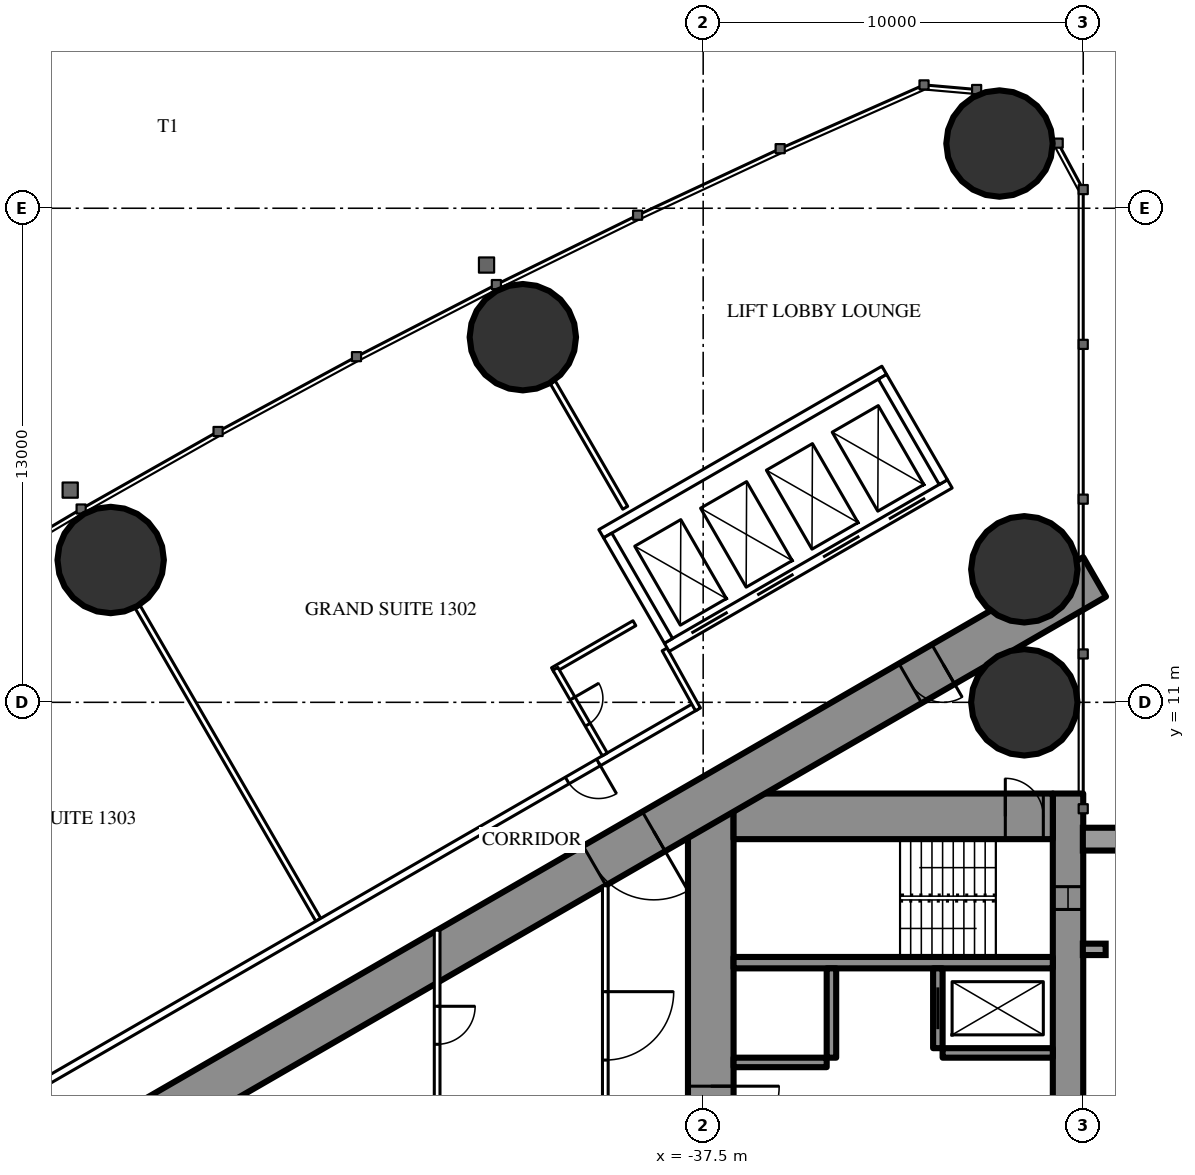
"""IFC4 building model, lengths in metres.
Left out: names, types, materials, properties, quantities, classifications, styles, units other than length and angle.
Written with IfcOpenShell. Run it as: python <this file> out.ifc"""

import sys

from ifc_helpers import new_model, si_unit, direction, frame, frame_2d, origin, origin_2d, place, context, subcontext, project, spatial, rectangle, hollow_circle, extrude, element, fill, save


model = new_model("IFC4")
c1 = context("Model", 3, precision=1e-05, world=origin(), true_north=direction((0.0, 1.0)))
c2 = subcontext(c1, "Body", "Model", "MODEL_VIEW")
j1 = project(units=[si_unit("LENGTHUNIT", "METRE"), si_unit("PLANEANGLEUNIT", "RADIAN")], contexts=[c1])
p1 = place(None, origin())
s1 = spatial("IfcSite", under=j1, at=p1, CompositionType="ELEMENT")
p2 = place(p1, origin())
s2 = spatial("IfcBuilding", under=s1, at=p2, CompositionType="ELEMENT")
p3 = place(p2, frame((0.0, 0.0, 53.0)))
s3 = spatial("IfcBuildingStorey", under=s2, at=p3, CompositionType="ELEMENT", Elevation=53.0)
for number, where, z_axis, x_axis in (
    (1, (-29.703, 25.703, 0.0), (0.0, 0.0, 1.0), (1.0, 0.0, 0.0)),
    (2, (-29.05, 11.0, 0.0), (0.0, 0.0, 1.0), (1.0, 0.0, 0.0)),
    (3, (-29.05, 14.5, 0.0), (0.0, 0.0, 1.0), (1.0, 0.0, 0.0)),
    (4, (-42.245, 20.607, 0.0), (0.0, 0.0, 1.0), (1.0, 0.0, 0.0)),
    (5, (-53.09, 14.745, 0.0), (0.0, 0.0, 1.0), (1.0, 0.0, 0.0)),
):
    element("IfcColumn", number, at=place(p3, frame(where, z_axis=z_axis, x_axis=x_axis)), inside=s3, PredefinedType="COLUMN", context=c2, shape_type="SweptSolid", body=[
        extrude(hollow_circle(Radius=1.4, WallThickness=0.12, at=origin_2d()), origin(), (0.0, 0.0, 1.0), 3.5),
    ])
p4 = place(p3, frame((-27.9, 8.6, 0.0), z_axis=(0.0, 0.0, 1.0), x_axis=(0.0, -1.0, 0.0)))
e6 = element("IfcWall", 6, at=p4, inside=s3, PredefinedType="SHEAR", context=c2, shape_type="SweptSolid", body=[
    extrude(rectangle(XDim=17.2, YDim=0.8, at=frame_2d((8.6, 0.0))), origin(), (0.0, 0.0, 1.0), 3.5),
])
p5 = place(p4, frame((2.45, 0.0, 0.6)))
e7 = element("IfcOpeningElement", 7, at=p5, cuts=e6, PredefinedType="OPENING", context=c2, shape_type="SweptSolid", body=[
    extrude(rectangle(XDim=0.6, YDim=2.1, at=frame_2d((0.3, 1.05))), frame((0.0, 0.41, 0.0), z_axis=(0.0, -1.0, 0.0), x_axis=(1.0, 0.0, 0.0)), (0.0, 0.0, 1.0), 0.82),
])
p6 = place(p4, frame((14.15, 0.0, 0.6)))
e8 = element("IfcOpeningElement", 8, at=p6, cuts=e6, PredefinedType="OPENING", context=c2, shape_type="SweptSolid", body=[
    extrude(rectangle(XDim=0.6, YDim=2.1, at=frame_2d((0.3, 1.05))), frame((0.0, 0.41, 0.0), z_axis=(0.0, -1.0, 0.0), x_axis=(1.0, 0.0, 0.0)), (0.0, 0.0, 1.0), 0.82),
])
p7 = place(p3, frame((-37.3, 8.6, 0.0), z_axis=(0.0, 0.0, 1.0), x_axis=(0.0, -1.0, 0.0)))
e9 = element("IfcWall", 9, at=p7, inside=s3, PredefinedType="SHEAR", context=c2, shape_type="SweptSolid", body=[
    extrude(rectangle(XDim=17.2, YDim=1.2, at=frame_2d((8.6, 0.0))), origin(), (0.0, 0.0, 1.0), 3.5),
])
p8 = place(p7, frame((7.7, 0.0, 0.0)))
e10 = element("IfcOpeningElement", 10, at=p8, cuts=e9, PredefinedType="OPENING", context=c2, shape_type="SweptSolid", body=[
    extrude(rectangle(XDim=1.8, YDim=2.2, at=frame_2d((0.9, 1.1))), frame((0.0, 0.61, 0.0), z_axis=(0.0, -1.0, 0.0), x_axis=(1.0, 0.0, 0.0)), (0.0, 0.0, 1.0), 1.22),
])
p9 = place(p3, frame((-28.3, 8.0, 0.0), z_axis=(0.0, 0.0, 1.0), x_axis=(-1.0, 0.0, 0.0)))
e11 = element("IfcWall", 11, at=p9, inside=s3, PredefinedType="SHEAR", context=c2, shape_type="SweptSolid", body=[
    extrude(rectangle(XDim=8.4, YDim=1.2, at=frame_2d((4.2, 0.0))), origin(), (0.0, 0.0, 1.0), 3.5),
])
p10 = place(p9, frame((0.25, 0.0, 0.0)))
e12 = element("IfcOpeningElement", 12, at=p10, cuts=e11, PredefinedType="OPENING", context=c2, shape_type="SweptSolid", body=[
    extrude(rectangle(XDim=1.0, YDim=2.2, at=frame_2d((0.5, 1.1))), frame((0.0, 0.61, 0.0), z_axis=(0.0, -1.0, 0.0), x_axis=(1.0, 0.0, 0.0)), (0.0, 0.0, 1.0), 1.22),
])
p11 = place(p3, frame((-28.3, 4.15, 0.0), z_axis=(0.0, 0.0, 1.0), x_axis=(-1.0, 0.0, 0.0)))
e13 = element("IfcWall", 13, at=p11, inside=s3, PredefinedType="SHEAR", context=c2, shape_type="SweptSolid", body=[
    extrude(rectangle(XDim=8.4, YDim=0.3, at=frame_2d((4.2, 0.0))), origin(), (0.0, 0.0, 1.0), 3.5),
])
p12 = place(p3, frame((-31.325, 4.0, 0.0), z_axis=(0.0, 0.0, 1.0), x_axis=(0.0, -1.0, 0.0)))
e14 = element("IfcWall", 14, at=p12, inside=s3, PredefinedType="SHEAR", context=c2, shape_type="SweptSolid", body=[
    extrude(rectangle(XDim=2.1, YDim=0.25, at=frame_2d((1.05, 0.0))), origin(), (0.0, 0.0, 1.0), 3.5),
])
p13 = place(p12, frame((0.5, 0.0, 0.0)))
e15 = element("IfcOpeningElement", 15, at=p13, cuts=e14, PredefinedType="OPENING", context=c2, shape_type="SweptSolid", body=[
    extrude(rectangle(XDim=1.1, YDim=2.2, at=frame_2d((0.55, 1.1))), frame((0.0, 0.135, 0.0), z_axis=(0.0, -1.0, 0.0), x_axis=(1.0, 0.0, 0.0)), (0.0, 0.0, 1.0), 0.27),
])
p14 = place(p3, frame((-34.125, 4.0, 0.0), z_axis=(0.0, 0.0, 1.0), x_axis=(0.0, -1.0, 0.0)))
e16 = element("IfcWall", 16, at=p14, inside=s3, PredefinedType="SHEAR", context=c2, shape_type="SweptSolid", body=[
    extrude(rectangle(XDim=2.35, YDim=0.25, at=frame_2d((1.175, 0.0))), origin(), (0.0, 0.0, 1.0), 3.5),
])
p15 = place(p3, frame((-28.3, 1.775, 0.0), z_axis=(0.0, 0.0, 1.0), x_axis=(-1.0, 0.0, 0.0)))
e17 = element("IfcWall", 17, at=p15, inside=s3, PredefinedType="SHEAR", context=c2, shape_type="SweptSolid", body=[
    extrude(rectangle(XDim=2.9, YDim=0.25, at=frame_2d((1.45, 0.0))), origin(), (0.0, 0.0, 1.0), 3.5),
])
p16 = place(p3, frame((-34.25, 1.525, 0.0), z_axis=(0.0, 0.0, 1.0), x_axis=(-1.0, 0.0, 0.0)))
e18 = element("IfcWall", 18, at=p16, inside=s3, PredefinedType="SHEAR", context=c2, shape_type="SweptSolid", body=[
    extrude(rectangle(XDim=2.45, YDim=0.25, at=frame_2d((1.225, 0.0))), origin(), (0.0, 0.0, 1.0), 3.5),
])
p17 = place(p3, frame((-27.2, 14.3, 0.0), z_axis=(0.0, 0.0, 1.0), x_axis=(-0.866026593062, -0.499997940104, 0.0)))
e19 = element("IfcWall", 19, at=p17, inside=s3, PredefinedType="SHEAR", context=c2, shape_type="SweptSolid", body=[
    extrude(rectangle(XDim=28.946, YDim=1.2, at=frame_2d((14.473, 0.0))), origin(), (0.0, 0.0, 1.0), 3.5),
])
p18 = place(p17, frame((4.6, 0.0, 0.0)))
e20 = element("IfcOpeningElement", 20, at=p18, cuts=e19, PredefinedType="OPENING", context=c2, shape_type="SweptSolid", body=[
    extrude(rectangle(XDim=1.0, YDim=2.2, at=frame_2d((0.5, 1.1))), frame((0.0, 0.61, 0.0), z_axis=(0.0, -1.0, 0.0), x_axis=(1.0, 0.0, 0.0)), (0.0, 0.0, 1.0), 1.22),
])
p19 = place(p17, frame((13.395, 0.0, 0.0)))
e21 = element("IfcOpeningElement", 21, at=p19, cuts=e19, PredefinedType="OPENING", context=c2, shape_type="SweptSolid", body=[
    extrude(rectangle(XDim=1.8, YDim=2.2, at=frame_2d((0.9, 1.1))), frame((0.0, 0.61, 0.0), z_axis=(0.0, -1.0, 0.0), x_axis=(1.0, 0.0, 0.0)), (0.0, 0.0, 1.0), 1.22),
])
p20 = place(p3, frame((-47.627, 5.278, 0.0), z_axis=(0.0, 0.0, 1.0), x_axis=(-0.500009844318, 0.86601972009, 0.0)))
e22 = element("IfcWall", 22, at=p20, inside=s3, PredefinedType="PARTITIONING", context=c2, shape_type="SweptSolid", body=[
    extrude(rectangle(XDim=9.51, YDim=0.15, at=frame_2d((4.755, 0.0))), origin(), (0.0, 0.0, 1.0), 2.25),
])
p21 = place(p3, frame((-39.551, 16.119, 0.0), z_axis=(0.0, 0.0, 1.0), x_axis=(-0.500014214979, 0.866017196607, 0.0)))
e23 = element("IfcWall", 23, at=p21, inside=s3, PredefinedType="PARTITIONING", context=c2, shape_type="SweptSolid", body=[
    extrude(rectangle(XDim=3.815, YDim=0.15, at=frame_2d((1.907, 0.0))), origin(), (0.0, 0.0, 1.0), 3.25),
])
p22 = place(p3, frame((-37.7, 10.894, 0.0), z_axis=(0.0, 0.0, 1.0), x_axis=(-0.866027905338, -0.499995667157, 0.0)))
e24 = element("IfcWall", 24, at=p22, inside=s3, PredefinedType="PARTITIONING", context=c2, shape_type="SweptSolid", body=[
    extrude(rectangle(XDim=21.787, YDim=0.2, at=frame_2d((10.894, 0.0))), origin(), (0.0, 0.0, 1.0), 3.25),
])
p23 = place(p22, frame((20.237, 0.0, 0.0)))
e25 = element("IfcOpeningElement", 25, at=p23, cuts=e24, PredefinedType="OPENING", context=c2, shape_type="SweptSolid", body=[
    extrude(rectangle(XDim=0.95, YDim=2.2, at=frame_2d((0.475, 1.1))), frame((0.0, 0.11, 0.0), z_axis=(0.0, -1.0, 0.0), x_axis=(1.0, 0.0, 0.0)), (0.0, 0.0, 1.0), 0.22),
])
p24 = place(p22, frame((2.95, 0.0, 0.0)))
e26 = element("IfcOpeningElement", 26, at=p24, cuts=e24, PredefinedType="OPENING", context=c2, shape_type="SweptSolid", body=[
    extrude(rectangle(XDim=0.95, YDim=2.2, at=frame_2d((0.475, 1.1))), frame((0.0, 0.11, 0.0), z_axis=(0.0, -1.0, 0.0), x_axis=(1.0, 0.0, 0.0)), (0.0, 0.0, 1.0), 0.22),
])
p25 = place(p3, frame((-38.513, 12.392, 0.0), z_axis=(0.0, 0.0, 1.0), x_axis=(0.485585508183, -0.874189175317, 0.0)))
e27 = element("IfcWall", 27, at=p25, inside=s3, PredefinedType="PARTITIONING", context=c2, shape_type="SweptSolid", body=[
    extrude(rectangle(XDim=1.805, YDim=0.15, at=frame_2d((0.902, 0.0))), origin(), (0.0, 0.0, 1.0), 3.25),
])
p26 = place(p3, frame((-39.31, 13.082, 0.0), z_axis=(0.0, 0.0, 1.0), x_axis=(-0.866031185235, -0.4999899861, 0.0)))
e28 = element("IfcWall", 28, at=p26, inside=s3, PredefinedType="PARTITIONING", context=c2, shape_type="SweptSolid", body=[
    extrude(rectangle(XDim=2.475, YDim=0.15, at=frame_2d((1.238, 0.0))), origin(), (0.0, 0.0, 1.0), 3.25),
])
p27 = place(p3, frame((-40.088, 9.63, 0.0), z_axis=(0.0, 0.0, 1.0), x_axis=(-0.500006934395, 0.866021400173, 0.0)))
e29 = element("IfcWall", 29, at=p27, inside=s3, PredefinedType="PARTITIONING", context=c2, shape_type="SweptSolid", body=[
    extrude(rectangle(XDim=2.6, YDim=0.15, at=frame_2d((1.3, 0.0))), origin(), (0.0, 0.0, 1.0), 3.25),
])
p28 = place(p27, frame((0.9, 0.0, 0.0)))
e30 = element("IfcOpeningElement", 30, at=p28, cuts=e29, PredefinedType="OPENING", context=c2, shape_type="SweptSolid", body=[
    extrude(rectangle(XDim=0.8, YDim=2.2, at=frame_2d((0.4, 1.1))), frame((0.0, 0.085, 0.0), z_axis=(0.0, -1.0, 0.0), x_axis=(1.0, 0.0, 0.0)), (0.0, 0.0, 1.0), 0.17),
])
p29 = place(p3, frame((-40.075, 6.174, 0.0), z_axis=(0.0, 0.0, 1.0), x_axis=(0.0, -1.0, 0.0)))
e31 = element("IfcWall", 31, at=p29, inside=s3, PredefinedType="PARTITIONING", context=c2, shape_type="SweptSolid", body=[
    extrude(rectangle(XDim=7.374, YDim=0.15, at=frame_2d((3.687, 0.0))), origin(), (0.0, 0.0, 1.0), 3.25),
])
p30 = place(p29, frame((2.787, 0.0, 0.0)))
e32 = element("IfcOpeningElement", 32, at=p30, cuts=e31, PredefinedType="OPENING", context=c2, shape_type="SweptSolid", body=[
    extrude(rectangle(XDim=1.8, YDim=2.2, at=frame_2d((0.9, 1.1))), frame((0.0, 0.085, 0.0), z_axis=(0.0, -1.0, 0.0), x_axis=(1.0, 0.0, 0.0)), (0.0, 0.0, 1.0), 0.17),
])
p31 = place(p3, frame((-44.5, 5.005, 0.0), z_axis=(0.0, 0.0, 1.0), x_axis=(0.0, -1.0, 0.0)))
e33 = element("IfcWall", 33, at=p31, inside=s3, PredefinedType="PARTITIONING", context=c2, shape_type="SweptSolid", body=[
    extrude(rectangle(XDim=10.009, YDim=0.15, at=frame_2d((5.005, 0.0))), origin(), (0.0, 0.0, 1.0), 2.45),
])
p32 = place(p31, frame((2.002, 0.0, 0.0)))
e34 = element("IfcOpeningElement", 34, at=p32, cuts=e33, PredefinedType="OPENING", context=c2, shape_type="SweptSolid", body=[
    extrude(rectangle(XDim=1.0, YDim=2.2, at=frame_2d((0.5, 1.1))), frame((0.0, 0.085, 0.0), z_axis=(0.0, -1.0, 0.0), x_axis=(1.0, 0.0, 0.0)), (0.0, 0.0, 1.0), 0.17),
])
p33 = place(p31, frame((7.007, 0.0, 0.0)))
e35 = element("IfcOpeningElement", 35, at=p33, cuts=e33, PredefinedType="OPENING", context=c2, shape_type="SweptSolid", body=[
    extrude(rectangle(XDim=1.0, YDim=2.2, at=frame_2d((0.5, 1.1))), frame((0.0, 0.085, 0.0), z_axis=(0.0, -1.0, 0.0), x_axis=(1.0, 0.0, 0.0)), (0.0, 0.0, 1.0), 0.17),
])
p34 = place(p3, frame((-31.01, 16.747, 0.0), z_axis=(0.0, 0.0, 1.0), x_axis=(-0.866028165386, -0.499995216735, 0.0)))
e36 = element("IfcWall", 36, at=p34, inside=s3, PredefinedType="PARTITIONING", context=c2, shape_type="SweptSolid", body=[
    extrude(rectangle(XDim=8.6, YDim=0.25, at=frame_2d((4.3, 0.0))), origin(), (0.0, 0.0, 1.0), 3.25),
])
p35 = place(p34, frame((0.75, 0.0, 0.0)))
e37 = element("IfcOpeningElement", 37, at=p35, cuts=e36, PredefinedType="OPENING", context=c2, shape_type="SweptSolid", body=[
    extrude(rectangle(XDim=1.1, YDim=2.2, at=frame_2d((0.55, 1.1))), frame((0.0, 0.135, 0.0), z_axis=(0.0, -1.0, 0.0), x_axis=(1.0, 0.0, 0.0)), (0.0, 0.0, 1.0), 0.27),
])
p36 = place(p34, frame((2.75, 0.0, 0.0)))
e38 = element("IfcOpeningElement", 38, at=p36, cuts=e36, PredefinedType="OPENING", context=c2, shape_type="SweptSolid", body=[
    extrude(rectangle(XDim=1.1, YDim=2.2, at=frame_2d((0.55, 1.1))), frame((0.0, 0.135, 0.0), z_axis=(0.0, -1.0, 0.0), x_axis=(1.0, 0.0, 0.0)), (0.0, 0.0, 1.0), 0.27),
])
p37 = place(p34, frame((4.75, 0.0, 0.0)))
e39 = element("IfcOpeningElement", 39, at=p37, cuts=e36, PredefinedType="OPENING", context=c2, shape_type="SweptSolid", body=[
    extrude(rectangle(XDim=1.1, YDim=2.2, at=frame_2d((0.55, 1.1))), frame((0.0, 0.135, 0.0), z_axis=(0.0, -1.0, 0.0), x_axis=(1.0, 0.0, 0.0)), (0.0, 0.0, 1.0), 0.27),
])
p38 = place(p34, frame((6.75, 0.0, 0.0)))
e40 = element("IfcOpeningElement", 40, at=p38, cuts=e36, PredefinedType="OPENING", context=c2, shape_type="SweptSolid", body=[
    extrude(rectangle(XDim=1.1, YDim=2.2, at=frame_2d((0.55, 1.1))), frame((0.0, 0.135, 0.0), z_axis=(0.0, -1.0, 0.0), x_axis=(1.0, 0.0, 0.0)), (0.0, 0.0, 1.0), 0.27),
])
p39 = place(p3, frame((-32.736, 19.736, 0.0), z_axis=(0.0, 0.0, 1.0), x_axis=(-0.866028165386, -0.499995216735, 0.0)))
e41 = element("IfcWall", 41, at=p39, inside=s3, PredefinedType="PARTITIONING", context=c2, shape_type="SweptSolid", body=[
    extrude(rectangle(XDim=8.6, YDim=0.25, at=frame_2d((4.3, 0.0))), origin(), (0.0, 0.0, 1.0), 3.25),
])
p40 = place(p3, frame((-31.181, 16.793, 0.0), z_axis=(0.0, 0.0, 1.0), x_axis=(-0.499929347863, 0.866066190972, 0.0)))
e42 = element("IfcWall", 42, at=p40, inside=s3, PredefinedType="PARTITIONING", context=c2, shape_type="SweptSolid", body=[
    extrude(rectangle(XDim=3.201, YDim=0.25, at=frame_2d((1.6, 0.0))), origin(), (0.0, 0.0, 1.0), 3.25),
])
p41 = place(p3, frame((-38.413, 12.618, 0.0), z_axis=(0.0, 0.0, 1.0), x_axis=(-0.499872130319, 0.866099216793, 0.0)))
e43 = element("IfcWall", 43, at=p41, inside=s3, PredefinedType="PARTITIONING", context=c2, shape_type="SweptSolid", body=[
    extrude(rectangle(XDim=3.2, YDim=0.25, at=frame_2d((1.6, 0.0))), origin(), (0.0, 0.0, 1.0), 3.25),
])
p42 = place(p28, origin())
e44 = element("IfcDoor", 44, at=p42, inside=s3, OperationType="SINGLE_SWING_RIGHT", PredefinedType="DOOR", context=c2, shape_type="SweptSolid", body=[
    extrude(rectangle(XDim=0.8, YDim=2.2, at=frame_2d((0.4, 1.1))), frame((0.0, 0.025, 0.0), z_axis=(0.0, -1.0, 0.0), x_axis=(1.0, 0.0, 0.0)), (0.0, 0.0, 1.0), 0.05),
])
fill(e30, e44)
p43 = place(p24, origin())
e45 = element("IfcDoor", 45, at=p43, inside=s3, OperationType="SINGLE_SWING_LEFT", PredefinedType="DOOR", context=c2, shape_type="SweptSolid", body=[
    extrude(rectangle(XDim=0.95, YDim=2.2, at=frame_2d((0.475, 1.1))), frame((0.0, 0.025, 0.0), z_axis=(0.0, -1.0, 0.0), x_axis=(1.0, 0.0, 0.0)), (0.0, 0.0, 1.0), 0.05),
])
fill(e26, e45)
p44 = place(p30, origin())
e46 = element("IfcDoor", 46, at=p44, inside=s3, OperationType="DOUBLE_DOOR_SINGLE_SWING", PredefinedType="DOOR", context=c2, shape_type="SweptSolid", body=[
    extrude(rectangle(XDim=1.8, YDim=2.2, at=frame_2d((0.9, 1.1))), frame((0.0, 0.025, 0.0), z_axis=(0.0, -1.0, 0.0), x_axis=(1.0, 0.0, 0.0)), (0.0, 0.0, 1.0), 0.05),
])
fill(e32, e46)
p45 = place(p32, origin())
e47 = element("IfcDoor", 47, at=p45, inside=s3, OperationType="SINGLE_SWING_LEFT", PredefinedType="DOOR", context=c2, shape_type="SweptSolid", body=[
    extrude(rectangle(XDim=1.0, YDim=2.2, at=frame_2d((0.5, 1.1))), frame((0.0, 0.025, 0.0), z_axis=(0.0, -1.0, 0.0), x_axis=(1.0, 0.0, 0.0)), (0.0, 0.0, 1.0), 0.05),
])
fill(e34, e47)
p46 = place(p18, origin())
e48 = element("IfcDoor", 48, at=p46, inside=s3, OperationType="SINGLE_SWING_LEFT", PredefinedType="DOOR", context=c2, shape_type="SweptSolid", body=[
    extrude(rectangle(XDim=1.0, YDim=2.2, at=frame_2d((0.5, 1.1))), frame((0.0, 0.025, 0.0), z_axis=(0.0, -1.0, 0.0), x_axis=(1.0, 0.0, 0.0)), (0.0, 0.0, 1.0), 0.05),
])
fill(e20, e48)
p47 = place(p19, origin())
e49 = element("IfcDoor", 49, at=p47, inside=s3, OperationType="DOUBLE_DOOR_SINGLE_SWING", PredefinedType="DOOR", context=c2, shape_type="SweptSolid", body=[
    extrude(rectangle(XDim=1.8, YDim=2.2, at=frame_2d((0.9, 1.1))), frame((0.0, 0.025, 0.0), z_axis=(0.0, -1.0, 0.0), x_axis=(1.0, 0.0, 0.0)), (0.0, 0.0, 1.0), 0.05),
])
fill(e21, e49)
p48 = place(p8, origin())
e50 = element("IfcDoor", 50, at=p48, inside=s3, OperationType="DOUBLE_DOOR_SINGLE_SWING", PredefinedType="DOOR", context=c2, shape_type="SweptSolid", body=[
    extrude(rectangle(XDim=1.8, YDim=2.2, at=frame_2d((0.9, 1.1))), frame((0.0, 0.025, 0.0), z_axis=(0.0, -1.0, 0.0), x_axis=(1.0, 0.0, 0.0)), (0.0, 0.0, 1.0), 0.05),
])
fill(e10, e50)
p49 = place(p10, origin())
e51 = element("IfcDoor", 51, at=p49, inside=s3, OperationType="SINGLE_SWING_RIGHT", PredefinedType="DOOR", context=c2, shape_type="SweptSolid", body=[
    extrude(rectangle(XDim=1.0, YDim=2.2, at=frame_2d((0.5, 1.1))), frame((0.0, 0.025, 0.0), z_axis=(0.0, -1.0, 0.0), x_axis=(1.0, 0.0, 0.0)), (0.0, 0.0, 1.0), 0.05),
])
fill(e12, e51)
p50 = place(p13, origin())
e52 = element("IfcDoor", 52, at=p50, inside=s3, OperationType="SLIDING_TO_LEFT", PredefinedType="USERDEFINED", context=c2, shape_type="SweptSolid", body=[
    extrude(rectangle(XDim=1.1, YDim=2.2, at=frame_2d((0.55, 1.1))), frame((0.0, 0.025, 0.0), z_axis=(0.0, -1.0, 0.0), x_axis=(1.0, 0.0, 0.0)), (0.0, 0.0, 1.0), 0.05),
])
fill(e15, e52)
p51 = place(p35, origin())
e53 = element("IfcDoor", 53, at=p51, inside=s3, OperationType="DOUBLE_DOOR_SLIDING", PredefinedType="USERDEFINED", context=c2, shape_type="SweptSolid", body=[
    extrude(rectangle(XDim=1.1, YDim=2.2, at=frame_2d((0.55, 1.1))), frame((0.0, 0.025, 0.0), z_axis=(0.0, -1.0, 0.0), x_axis=(1.0, 0.0, 0.0)), (0.0, 0.0, 1.0), 0.05),
])
fill(e37, e53)
p52 = place(p36, origin())
e54 = element("IfcDoor", 54, at=p52, inside=s3, OperationType="DOUBLE_DOOR_SLIDING", PredefinedType="USERDEFINED", context=c2, shape_type="SweptSolid", body=[
    extrude(rectangle(XDim=1.1, YDim=2.2, at=frame_2d((0.55, 1.1))), frame((0.0, 0.025, 0.0), z_axis=(0.0, -1.0, 0.0), x_axis=(1.0, 0.0, 0.0)), (0.0, 0.0, 1.0), 0.05),
])
fill(e38, e54)
p53 = place(p37, origin())
e55 = element("IfcDoor", 55, at=p53, inside=s3, OperationType="DOUBLE_DOOR_SLIDING", PredefinedType="USERDEFINED", context=c2, shape_type="SweptSolid", body=[
    extrude(rectangle(XDim=1.1, YDim=2.2, at=frame_2d((0.55, 1.1))), frame((0.0, 0.025, 0.0), z_axis=(0.0, -1.0, 0.0), x_axis=(1.0, 0.0, 0.0)), (0.0, 0.0, 1.0), 0.05),
])
fill(e39, e55)
p54 = place(p38, origin())
e56 = element("IfcDoor", 56, at=p54, inside=s3, OperationType="DOUBLE_DOOR_SLIDING", PredefinedType="USERDEFINED", context=c2, shape_type="SweptSolid", body=[
    extrude(rectangle(XDim=1.1, YDim=2.2, at=frame_2d((0.55, 1.1))), frame((0.0, 0.025, 0.0), z_axis=(0.0, -1.0, 0.0), x_axis=(1.0, 0.0, 0.0)), (0.0, 0.0, 1.0), 0.05),
])
fill(e40, e56)
p55 = place(p5, origin())
e57 = element("IfcWindow", 57, at=p55, inside=s3, PartitioningType="SINGLE_PANEL", PredefinedType="WINDOW", context=c2, shape_type="SweptSolid", body=[
    extrude(rectangle(XDim=0.6, YDim=2.1, at=frame_2d((0.3, 1.05))), frame((0.0, 0.03, 0.0), z_axis=(0.0, -1.0, 0.0), x_axis=(1.0, 0.0, 0.0)), (0.0, 0.0, 1.0), 0.06),
])
fill(e7, e57)
save(model, sys.argv[1])
